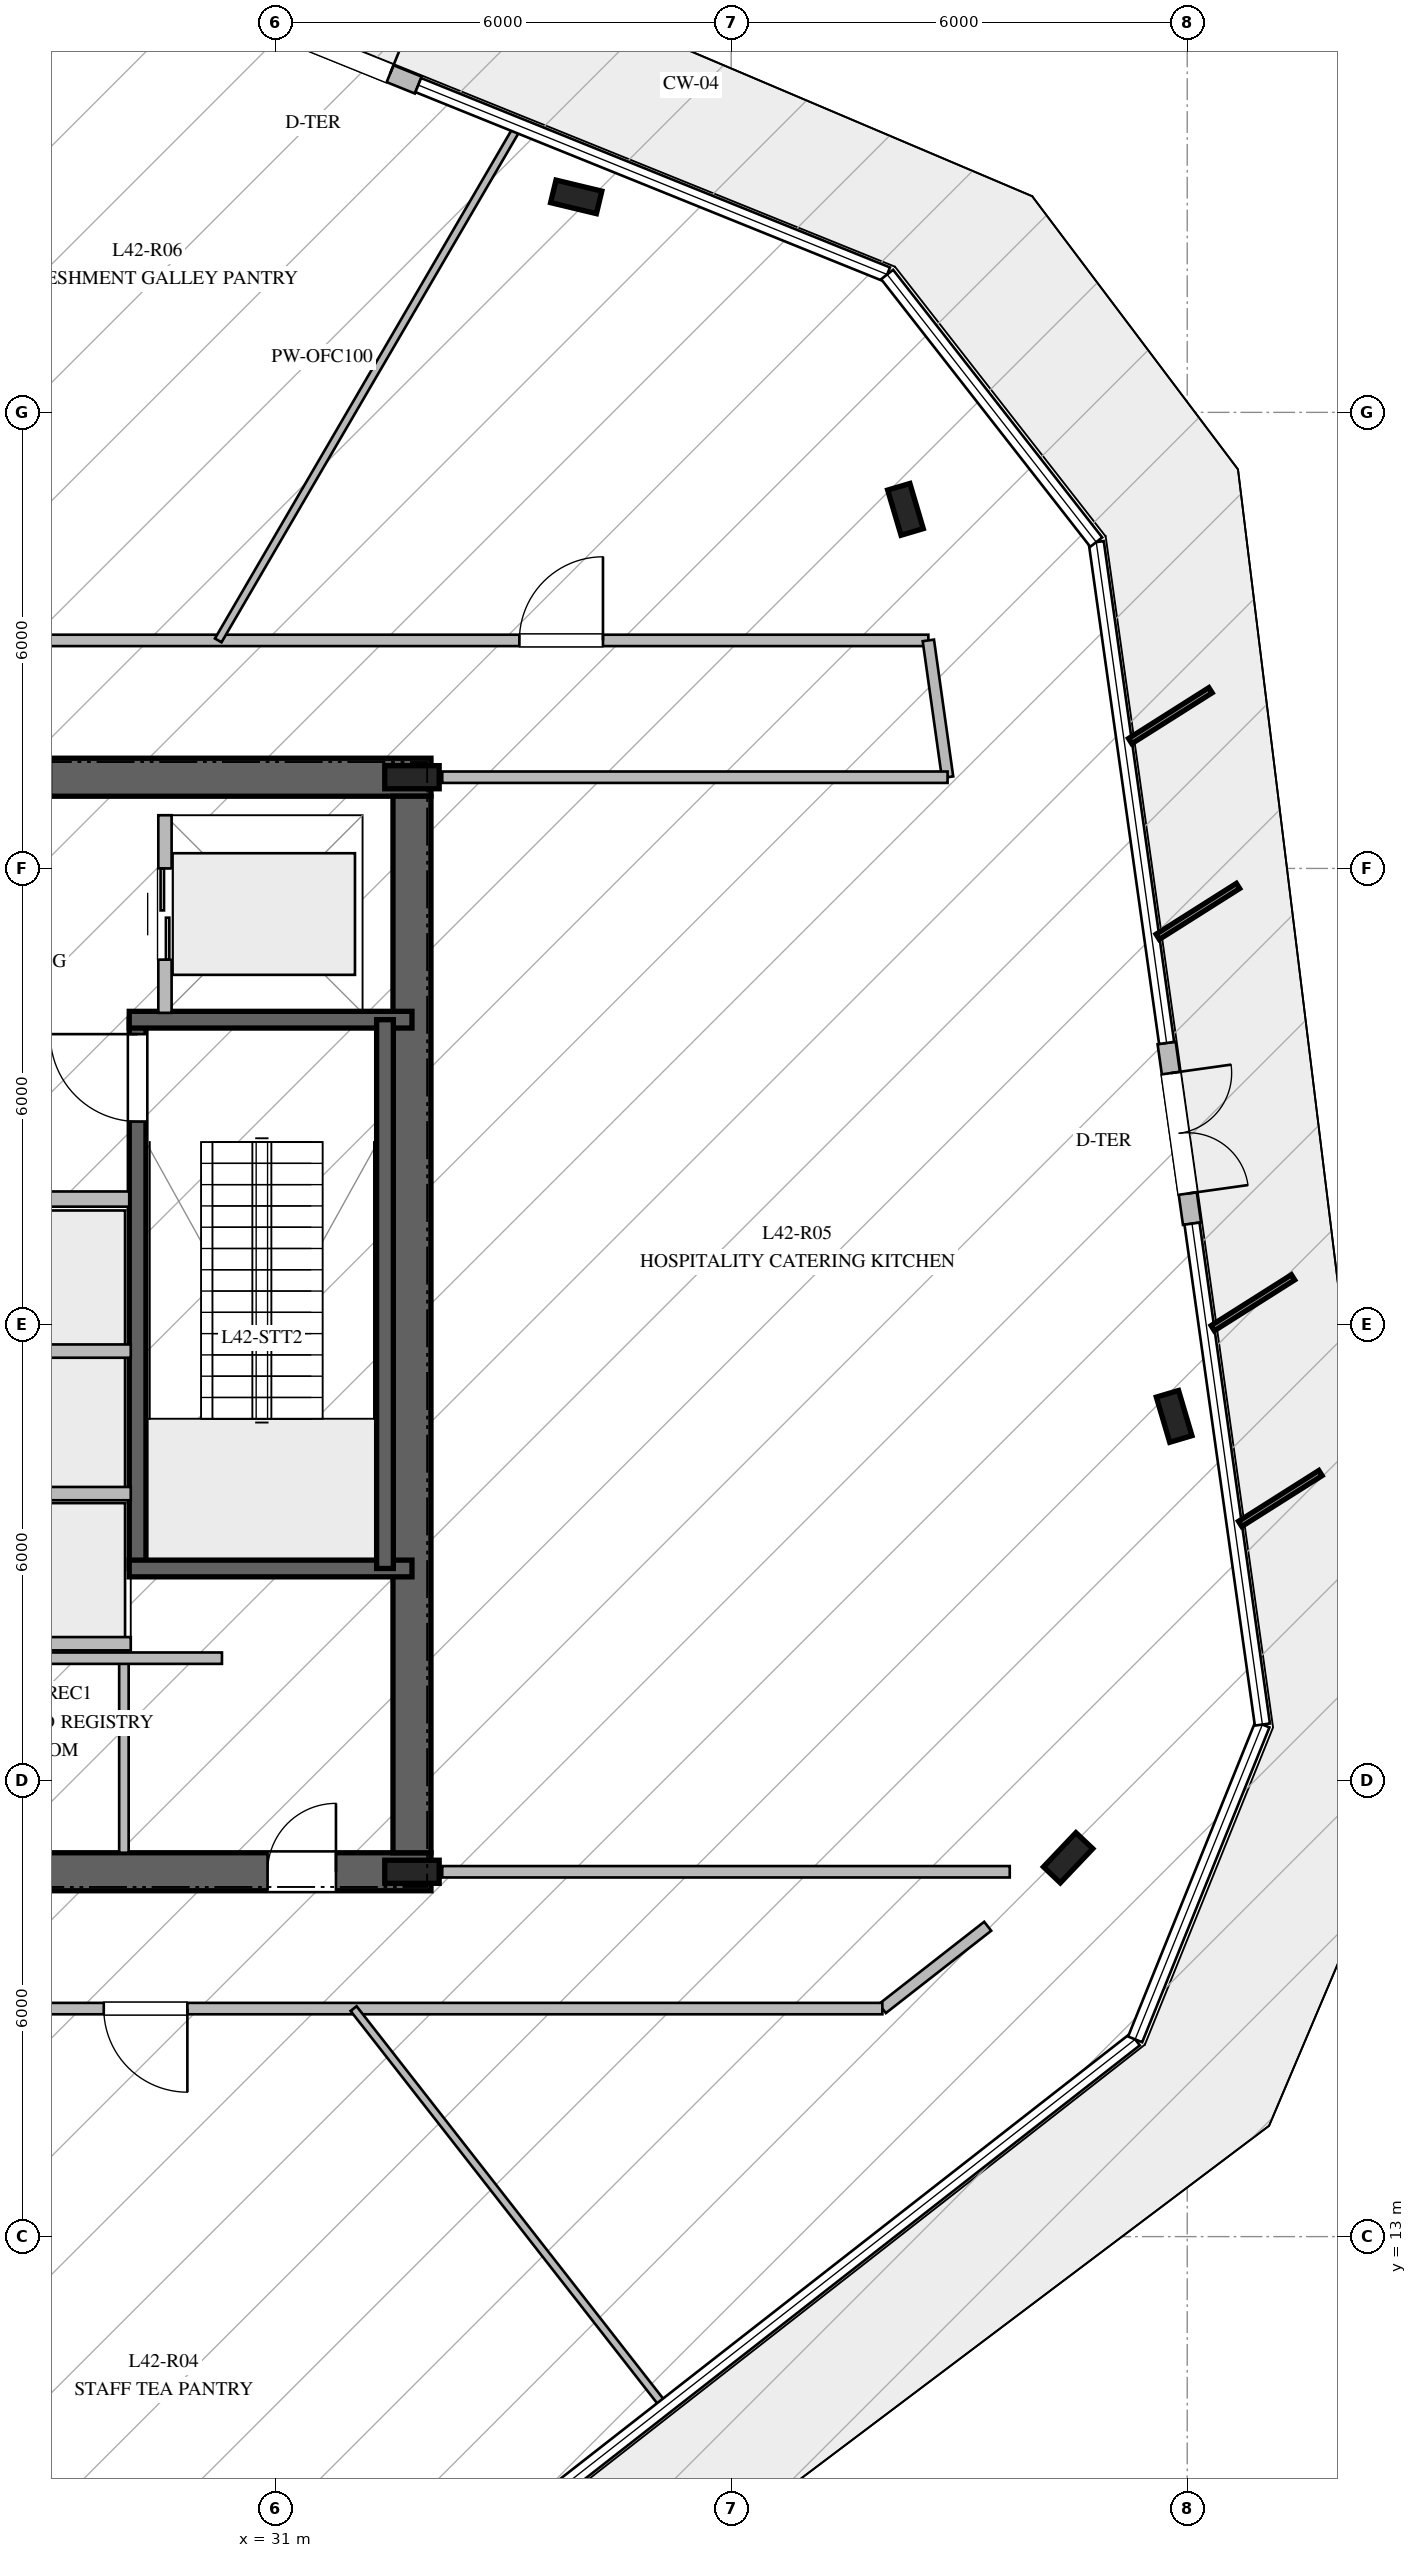
"""IFC4 building model, lengths in metres.
Left out: names, types, materials, properties, quantities, classifications, styles, units other than length and angle.
Written with IfcOpenShell. Run it as: python <this file> out.ifc"""

import sys

from ifc_helpers import new_model, si_unit, direction, frame, frame_2d, origin, origin_2d, place, context, subcontext, project, spatial, rectangle, i_section, extrude, element, fill, save


model = new_model("IFC4")
c1 = context("Model", 3, precision=1e-05, world=origin(), true_north=direction((0.0, 1.0)))
c2 = subcontext(c1, "Body", "Model", "MODEL_VIEW")
j1 = project(units=[si_unit("LENGTHUNIT", "METRE"), si_unit("PLANEANGLEUNIT", "RADIAN")], contexts=[c1])
p1 = place(None, origin())
s1 = spatial("IfcSite", under=j1, at=p1, CompositionType="ELEMENT")
p2 = place(p1, origin())
s2 = spatial("IfcBuilding", under=s1, at=p2, CompositionType="ELEMENT")
p3 = place(p2, frame((0.0, 0.0, 175.8)))
s3 = spatial("IfcBuildingStorey", under=s2, at=p3, CompositionType="ELEMENT", Elevation=175.8)
p4 = place(p3, frame((16.95, 17.8, 0.0), z_axis=(0.0, 0.0, 1.0), x_axis=(1.0, 0.0, 0.0)))
e1 = element("IfcWall", 1, at=p4, inside=s3, PredefinedType="SHEAR", context=c2, shape_type="SweptSolid", body=[
    extrude(rectangle(XDim=16.1, YDim=0.5, at=frame_2d((8.05, 0.0))), origin(), (0.0, 0.0, 1.0), 4.78),
])
p5 = place(p4, frame((5.0, 0.0, 0.0)))
e2 = element("IfcOpeningElement", 2, at=p5, cuts=e1, PredefinedType="OPENING", context=c2, shape_type="SweptSolid", body=[
    extrude(rectangle(XDim=1.2, YDim=2.25, at=frame_2d((0.6, 1.125))), frame((0.0, 0.26, 0.0), z_axis=(0.0, -1.0, 0.0), x_axis=(1.0, 0.0, 0.0)), (0.0, 0.0, 1.0), 0.52),
])
p6 = place(p4, frame((13.95, 0.0, 0.0)))
e3 = element("IfcOpeningElement", 3, at=p6, cuts=e1, PredefinedType="OPENING", context=c2, shape_type="SweptSolid", body=[
    extrude(rectangle(XDim=0.9, YDim=2.1, at=frame_2d((0.45, 1.05))), frame((0.0, 0.26, 0.0), z_axis=(0.0, -1.0, 0.0), x_axis=(1.0, 0.0, 0.0)), (0.0, 0.0, 1.0), 0.52),
])
p7 = place(p4, frame((9.2, 0.0, 0.0)))
e4 = element("IfcOpeningElement", 4, at=p7, cuts=e1, PredefinedType="OPENING", context=c2, shape_type="SweptSolid", body=[
    extrude(rectangle(XDim=1.1, YDim=2.2, at=frame_2d((0.55, 1.1))), frame((0.0, 0.26, 0.0), z_axis=(0.0, -1.0, 0.0), x_axis=(1.0, 0.0, 0.0)), (0.0, 0.0, 1.0), 0.52),
])
p8 = place(p3, frame((33.05, 32.2, 0.0), z_axis=(0.0, 0.0, 1.0), x_axis=(-1.0, 0.0, 0.0)))
e5 = element("IfcWall", 5, at=p8, inside=s3, PredefinedType="SHEAR", context=c2, shape_type="SweptSolid", body=[
    extrude(rectangle(XDim=16.1, YDim=0.5, at=frame_2d((8.05, 0.0))), origin(), (0.0, 0.0, 1.0), 4.78),
])
p9 = place(p8, frame((5.0, 0.0, 0.0)))
e6 = element("IfcOpeningElement", 6, at=p9, cuts=e5, PredefinedType="OPENING", context=c2, shape_type="SweptSolid", body=[
    extrude(rectangle(XDim=1.2, YDim=2.25, at=frame_2d((0.6, 1.125))), frame((0.0, 0.26, 0.0), z_axis=(0.0, -1.0, 0.0), x_axis=(1.0, 0.0, 0.0)), (0.0, 0.0, 1.0), 0.52),
])
p10 = place(p8, frame((11.8, 0.0, 0.0)))
e7 = element("IfcOpeningElement", 7, at=p10, cuts=e5, PredefinedType="OPENING", context=c2, shape_type="SweptSolid", body=[
    extrude(rectangle(XDim=1.1, YDim=2.2, at=frame_2d((0.55, 1.1))), frame((0.0, 0.26, 0.0), z_axis=(0.0, -1.0, 0.0), x_axis=(1.0, 0.0, 0.0)), (0.0, 0.0, 1.0), 0.52),
])
p11 = place(p8, frame((9.825, 0.0, 0.0)))
e8 = element("IfcOpeningElement", 8, at=p11, cuts=e5, PredefinedType="OPENING", context=c2, shape_type="SweptSolid", body=[
    extrude(rectangle(XDim=1.1, YDim=2.2, at=frame_2d((0.55, 1.1))), frame((0.0, 0.26, 0.0), z_axis=(0.0, -1.0, 0.0), x_axis=(1.0, 0.0, 0.0)), (0.0, 0.0, 1.0), 0.52),
])
p12 = place(p8, frame((7.85, 0.0, 0.0)))
e9 = element("IfcOpeningElement", 9, at=p12, cuts=e5, PredefinedType="OPENING", context=c2, shape_type="SweptSolid", body=[
    extrude(rectangle(XDim=1.1, YDim=2.2, at=frame_2d((0.55, 1.1))), frame((0.0, 0.26, 0.0), z_axis=(0.0, -1.0, 0.0), x_axis=(1.0, 0.0, 0.0)), (0.0, 0.0, 1.0), 0.52),
])
p13 = place(p3, frame((32.8, 18.05, 0.0), z_axis=(0.0, 0.0, 1.0), x_axis=(0.0, 1.0, 0.0)))
e10 = element("IfcWall", 10, at=p13, inside=s3, PredefinedType="SHEAR", context=c2, shape_type="SweptSolid", body=[
    extrude(rectangle(XDim=13.9, YDim=0.5, at=frame_2d((6.95, 0.0))), origin(), (0.0, 0.0, 1.0), 4.78),
])
for number, where, z_axis, x_axis in (
    (11, (32.8, 17.8, 0.0), (0.0, 0.0, 1.0), (1.0, 0.0, 0.0)),
    (12, (32.8, 32.2, 0.0), (0.0, 0.0, 1.0), (1.0, 0.0, 0.0)),
):
    element("IfcColumn", number, at=place(p3, frame(where, z_axis=z_axis, x_axis=x_axis)), inside=s3, PredefinedType="COLUMN", context=c2, shape_type="SweptSolid", body=[
        extrude(i_section(OverallWidth=0.304, OverallDepth=0.716, WebThickness=0.021, FlangeThickness=0.04, at=origin_2d()), origin(), (0.0, 0.0, 1.0), 5.0),
    ])
p14 = place(p3, frame((29.19, 21.79, 0.0), z_axis=(0.0, 0.0, 1.0), x_axis=(0.0, 1.0, 0.0)))
e13 = element("IfcWall", 13, at=p14, inside=s3, PredefinedType="SOLIDWALL", context=c2, shape_type="SweptSolid", body=[
    extrude(rectangle(XDim=7.22, YDim=0.22, at=frame_2d((3.61, 0.0))), origin(), (0.0, 0.0, 1.0), 4.78),
])
p15 = place(p14, frame((5.88, 0.0, 0.0)))
e14 = element("IfcOpeningElement", 14, at=p15, cuts=e13, PredefinedType="OPENING", context=c2, shape_type="SweptSolid", body=[
    extrude(rectangle(XDim=1.15, YDim=2.2, at=frame_2d((0.575, 1.1))), frame((0.0, 0.12, 0.0), z_axis=(0.0, -1.0, 0.0), x_axis=(1.0, 0.0, 0.0)), (0.0, 0.0, 1.0), 0.24),
])
for number, where, z_axis, x_axis in (
    (15, (29.08, 21.79, 0.0), (0.0, 0.0, 1.0), (1.0, 0.0, 0.0)),
    (16, (29.08, 29.01, 0.0), (0.0, 0.0, 1.0), (1.0, 0.0, 0.0)),
):
    element("IfcWall", number, at=place(p3, frame(where, z_axis=z_axis, x_axis=x_axis)), inside=s3, PredefinedType="SOLIDWALL", context=c2, shape_type="SweptSolid", body=[
        extrude(rectangle(XDim=3.72, YDim=0.22, at=frame_2d((1.86, 0.0))), origin(), (0.0, 0.0, 1.0), 4.78),
    ])
p16 = place(p3, frame((32.445, 29.01, 0.0), z_axis=(0.0, 0.0, 1.0), x_axis=(0.0, -1.0, 0.0)))
e17 = element("IfcWall", 17, at=p16, inside=s3, PredefinedType="SOLIDWALL", context=c2, shape_type="SweptSolid", body=[
    extrude(rectangle(XDim=7.22, YDim=0.22, at=frame_2d((3.61, 0.0))), origin(), (0.0, 0.0, 1.0), 4.78),
])
for number, where, z_axis, x_axis in (
    (18, (34.961, 39.835, -0.27), (0.0, 0.0, 1.0), (-0.972, 0.233, 0.0)),
    (19, (41.433, 17.984, -0.27), (0.0, 0.0, 1.0), (0.688, 0.725, 0.0)),
    (20, (42.828, 23.791, -0.27), (0.0, 0.0, 1.0), (-0.284, 0.959, 0.0)),
    (21, (39.293, 35.724, -0.27), (0.0, 0.0, 1.0), (-0.284, 0.959, 0.0)),
):
    element("IfcColumn", number, at=place(p3, frame(where, z_axis=z_axis, x_axis=x_axis)), inside=s3, PredefinedType="COLUMN", context=c2, shape_type="SweptSolid", body=[
        extrude(i_section(OverallWidth=0.305, OverallDepth=0.62, WebThickness=0.021, FlangeThickness=0.04, at=origin_2d()), origin(), (0.0, 0.0, 1.0), 5.27),
    ])
p17 = place(p3, frame((32.883, 41.306, 0.0), z_axis=(0.0, 0.0, 1.0), x_axis=(-0.927158943198, 0.374668245315, 0.0)))
e22 = element("IfcWall", 22, at=p17, inside=s3, PredefinedType="STANDARD", context=c2, shape_type="SweptSolid", body=[
    extrude(rectangle(XDim=2.4, YDim=0.24, at=frame_2d((1.2, 0.0))), origin(), (0.0, 0.0, 1.0), 4.78),
])
p18 = place(p17, frame((0.4, 0.0, 0.0)))
e23 = element("IfcOpeningElement", 23, at=p18, cuts=e22, PredefinedType="OPENING", context=c2, shape_type="SweptSolid", body=[
    extrude(rectangle(XDim=1.6, YDim=2.25, at=frame_2d((0.8, 1.125))), frame((0.0, 0.13, 0.0), z_axis=(0.0, -1.0, 0.0), x_axis=(1.0, 0.0, 0.0)), (0.0, 0.0, 1.0), 0.26),
])
p19 = place(p3, frame((43.063, 26.327, 0.0), z_axis=(0.0, 0.0, 1.0), x_axis=(-0.139128609486, 0.990274320591, 0.0)))
e24 = element("IfcWall", 24, at=p19, inside=s3, PredefinedType="STANDARD", context=c2, shape_type="SweptSolid", body=[
    extrude(rectangle(XDim=2.401, YDim=0.24, at=frame_2d((1.2, 0.0))), origin(), (0.0, 0.0, 1.0), 4.78),
])
p20 = place(p19, frame((0.4, 0.0, 0.0)))
e25 = element("IfcOpeningElement", 25, at=p20, cuts=e24, PredefinedType="OPENING", context=c2, shape_type="SweptSolid", body=[
    extrude(rectangle(XDim=1.6, YDim=2.25, at=frame_2d((0.8, 1.125))), frame((0.0, 0.13, 0.0), z_axis=(0.0, -1.0, 0.0), x_axis=(1.0, 0.0, 0.0)), (0.0, 0.0, 1.0), 0.26),
])
p21 = place(p3, frame((25.7, 26.65, 0.0), z_axis=(0.0, 0.0, 1.0), x_axis=(1.0, 0.0, 0.0)))
e26 = element("IfcWall", 26, at=p21, inside=s3, PredefinedType="PARTITIONING", context=c2, shape_type="SweptSolid", body=[
    extrude(rectangle(XDim=3.38, YDim=0.2, at=frame_2d((1.69, 0.0))), origin(), (0.0, 0.0, 1.0), 4.78),
])
p22 = place(p3, frame((29.01, 18.05, 0.0), z_axis=(0.0, 0.0, 1.0), x_axis=(0.0, 1.0, 0.0)))
e27 = element("IfcWall", 27, at=p22, inside=s3, PredefinedType="PARTITIONING", context=c2, shape_type="SweptSolid", body=[
    extrude(rectangle(XDim=2.5, YDim=0.125, at=frame_2d((1.25, 0.0))), origin(), (0.0, 0.0, 1.0), 4.78),
])
p23 = place(p3, frame((24.4, 20.61, 0.0), z_axis=(0.0, 0.0, 1.0), x_axis=(1.0, 0.0, 0.0)))
e28 = element("IfcWall", 28, at=p23, inside=s3, PredefinedType="PARTITIONING", context=c2, shape_type="SweptSolid", body=[
    extrude(rectangle(XDim=5.9, YDim=0.15, at=frame_2d((2.95, 0.0))), origin(), (0.0, 0.0, 1.0), 4.78),
])
for number, where, z_axis, x_axis in (
    (29, (26.75, 20.8, 0.0), (0.0, 0.0, 1.0), (1.0, 0.0, 0.0)),
    (30, (26.75, 22.775, 0.0), (0.0, 0.0, 1.0), (1.0, 0.0, 0.0)),
    (31, (26.75, 24.65, 0.0), (0.0, 0.0, 1.0), (1.0, 0.0, 0.0)),
):
    element("IfcWall", number, at=place(p3, frame(where, z_axis=z_axis, x_axis=x_axis)), inside=s3, PredefinedType="PARTITIONING", context=c2, shape_type="SweptSolid", body=[
        extrude(rectangle(XDim=2.35, YDim=0.175, at=frame_2d((1.175, 0.0))), origin(), (0.0, 0.0, 1.0), 4.78),
    ])
p24 = place(p3, frame((29.55, 29.1, 0.0), z_axis=(0.0, 0.0, 1.0), x_axis=(0.0, 1.0, 0.0)))
e32 = element("IfcWall", 32, at=p24, inside=s3, PredefinedType="PARTITIONING", context=c2, shape_type="SweptSolid", body=[
    extrude(rectangle(XDim=2.6, YDim=0.175, at=frame_2d((1.3, 0.0))), origin(), (0.0, 0.0, 1.0), 4.78),
])
p25 = place(p24, frame((0.7, 0.0, 0.0)))
e33 = element("IfcOpeningElement", 33, at=p25, cuts=e32, PredefinedType="OPENING", context=c2, shape_type="SweptSolid", body=[
    extrude(rectangle(XDim=1.2, YDim=2.2, at=frame_2d((0.6, 1.1))), frame((0.0, 0.098, 0.0), z_axis=(0.0, -1.0, 0.0), x_axis=(1.0, 0.0, 0.0)), (0.0, 0.0, 1.0), 0.195),
])
p26 = place(p3, frame((25.95, 34.0, 0.0), z_axis=(0.0, 0.0, 1.0), x_axis=(1.0, 0.0, 0.0)))
e34 = element("IfcWall", 34, at=p26, inside=s3, PredefinedType="PARTITIONING", context=c2, shape_type="SweptSolid", body=[
    extrude(rectangle(XDim=13.644, YDim=0.15, at=frame_2d((6.822, 0.0))), origin(), (0.0, 0.0, 1.0), 4.18),
])
p27 = place(p26, frame((8.263, 0.0, 0.0)))
e35 = element("IfcOpeningElement", 35, at=p27, cuts=e34, PredefinedType="OPENING", context=c2, shape_type="SweptSolid", body=[
    extrude(rectangle(XDim=1.1, YDim=2.2, at=frame_2d((0.55, 1.1))), frame((0.0, 0.085, 0.0), z_axis=(0.0, -1.0, 0.0), x_axis=(1.0, 0.0, 0.0)), (0.0, 0.0, 1.0), 0.17),
])
p28 = place(p3, frame((39.594, 34.0, 0.0), z_axis=(0.0, 0.0, 1.0), x_axis=(0.139145761488, -0.990271910669, 0.0)))
e36 = element("IfcWall", 36, at=p28, inside=s3, PredefinedType="PARTITIONING", context=c2, shape_type="SweptSolid", body=[
    extrude(rectangle(XDim=1.818, YDim=0.15, at=frame_2d((0.909, 0.0))), origin(), (0.0, 0.0, 1.0), 4.18),
])
p29 = place(p3, frame((39.847, 32.2, 0.0), z_axis=(0.0, 0.0, 1.0), x_axis=(-1.0, 0.0, 0.0)))
e37 = element("IfcWall", 37, at=p29, inside=s3, PredefinedType="PARTITIONING", context=c2, shape_type="SweptSolid", body=[
    extrude(rectangle(XDim=6.649, YDim=0.15, at=frame_2d((3.324, 0.0))), origin(), (0.0, 0.0, 1.0), 4.28),
])
p30 = place(p3, frame((33.198, 17.8, 0.0), z_axis=(0.0, 0.0, 1.0), x_axis=(1.0, 0.0, 0.0)))
e38 = element("IfcWall", 38, at=p30, inside=s3, PredefinedType="PARTITIONING", context=c2, shape_type="SweptSolid", body=[
    extrude(rectangle(XDim=7.467, YDim=0.15, at=frame_2d((3.733, 0.0))), origin(), (0.0, 0.0, 1.0), 4.28),
])
p31 = place(p3, frame((40.375, 17.083, 0.0), z_axis=(0.0, 0.0, 1.0), x_axis=(-0.78796755412, -0.615716764149, 0.0)))
e39 = element("IfcWall", 39, at=p31, inside=s3, PredefinedType="PARTITIONING", context=c2, shape_type="SweptSolid", body=[
    extrude(rectangle(XDim=1.759, YDim=0.15, at=frame_2d((0.879, 0.0))), origin(), (0.0, 0.0, 1.0), 4.18),
])
p32 = place(p3, frame((38.989, 16.0, 0.0), z_axis=(0.0, 0.0, 1.0), x_axis=(-1.0, 0.0, 0.0)))
e40 = element("IfcWall", 40, at=p32, inside=s3, PredefinedType="PARTITIONING", context=c2, shape_type="SweptSolid", body=[
    extrude(rectangle(XDim=13.039, YDim=0.15, at=frame_2d((6.52, 0.0))), origin(), (0.0, 0.0, 1.0), 4.28),
])
p33 = place(p32, frame((9.144, 0.0, 0.0)))
e41 = element("IfcOpeningElement", 41, at=p33, cuts=e40, PredefinedType="OPENING", context=c2, shape_type="SweptSolid", body=[
    extrude(rectangle(XDim=1.1, YDim=2.2, at=frame_2d((0.55, 1.1))), frame((0.0, 0.085, 0.0), z_axis=(0.0, -1.0, 0.0), x_axis=(1.0, 0.0, 0.0)), (0.0, 0.0, 1.0), 0.17),
])
p34 = place(p3, frame((30.251, 34.0, 0.0), z_axis=(0.0, 0.0, 1.0), x_axis=(0.503904002924, 0.863759663238, 0.0)))
e42 = element("IfcWall", 42, at=p34, inside=s3, PredefinedType="MOVABLE", context=c2, shape_type="SweptSolid", body=[
    extrude(rectangle(XDim=7.825, YDim=0.1, at=frame_2d((3.913, 0.0))), origin(), (0.0, 0.0, 1.0), 4.05),
])
p35 = place(p3, frame((32.032, 16.0, 0.0), z_axis=(0.0, 0.0, 1.0), x_axis=(0.615676896023, -0.787998705395, 0.0)))
e43 = element("IfcWall", 43, at=p35, inside=s3, PredefinedType="MOVABLE", context=c2, shape_type="SweptSolid", body=[
    extrude(rectangle(XDim=6.633, YDim=0.1, at=frame_2d((3.317, 0.0))), origin(), (0.0, 0.0, 1.0), 4.18),
])
p36 = place(p18, frame((1.6, 0.0, 0.0), z_axis=(0.0, 0.0, 1.0), x_axis=(-1.0, 0.0, 0.0)))
e44 = element("IfcDoor", 44, at=p36, inside=s3, OperationType="DOUBLE_DOOR_SINGLE_SWING", PredefinedType="DOOR", context=c2, shape_type="SweptSolid", body=[
    extrude(rectangle(XDim=1.6, YDim=2.25, at=frame_2d((0.8, 1.125))), frame((0.0, 0.025, 0.0), z_axis=(0.0, -1.0, 0.0), x_axis=(1.0, 0.0, 0.0)), (0.0, 0.0, 1.0), 0.05),
])
fill(e23, e44)
p37 = place(p20, frame((1.6, 0.0, 0.0), z_axis=(0.0, 0.0, 1.0), x_axis=(-1.0, 0.0, 0.0)))
e45 = element("IfcDoor", 45, at=p37, inside=s3, OperationType="DOUBLE_DOOR_SINGLE_SWING", PredefinedType="DOOR", context=c2, shape_type="SweptSolid", body=[
    extrude(rectangle(XDim=1.6, YDim=2.25, at=frame_2d((0.8, 1.125))), frame((0.0, 0.025, 0.0), z_axis=(0.0, -1.0, 0.0), x_axis=(1.0, 0.0, 0.0)), (0.0, 0.0, 1.0), 0.05),
])
fill(e25, e45)
p38 = place(p15, origin())
e46 = element("IfcDoor", 46, at=p38, inside=s3, OperationType="SINGLE_SWING_RIGHT", PredefinedType="DOOR", context=c2, shape_type="SweptSolid", body=[
    extrude(rectangle(XDim=1.15, YDim=2.2, at=frame_2d((0.575, 1.1))), frame((0.0, 0.025, 0.0), z_axis=(0.0, -1.0, 0.0), x_axis=(1.0, 0.0, 0.0)), (0.0, 0.0, 1.0), 0.05),
])
fill(e14, e46)
p39 = place(p6, origin())
e47 = element("IfcDoor", 47, at=p39, inside=s3, OperationType="SINGLE_SWING_RIGHT", PredefinedType="DOOR", context=c2, shape_type="SweptSolid", body=[
    extrude(rectangle(XDim=0.9, YDim=2.1, at=frame_2d((0.45, 1.05))), frame((0.0, 0.025, 0.0), z_axis=(0.0, -1.0, 0.0), x_axis=(1.0, 0.0, 0.0)), (0.0, 0.0, 1.0), 0.05),
])
fill(e3, e47)
p40 = place(p25, origin())
e48 = element("IfcDoor", 48, at=p40, inside=s3, OperationType="DOUBLE_DOOR_SLIDING", PredefinedType="DOOR", context=c2, shape_type="SweptSolid", body=[
    extrude(rectangle(XDim=1.2, YDim=2.2, at=frame_2d((0.6, 1.1))), frame((0.0, 0.025, 0.0), z_axis=(0.0, -1.0, 0.0), x_axis=(1.0, 0.0, 0.0)), (0.0, 0.0, 1.0), 0.05),
])
fill(e33, e48)
p41 = place(p33, origin())
e49 = element("IfcDoor", 49, at=p41, inside=s3, OperationType="SINGLE_SWING_LEFT", PredefinedType="DOOR", context=c2, shape_type="SweptSolid", body=[
    extrude(rectangle(XDim=1.1, YDim=2.2, at=frame_2d((0.55, 1.1))), frame((0.0, 0.025, 0.0), z_axis=(0.0, -1.0, 0.0), x_axis=(1.0, 0.0, 0.0)), (0.0, 0.0, 1.0), 0.05),
])
fill(e41, e49)
p42 = place(p27, origin())
e50 = element("IfcDoor", 50, at=p42, inside=s3, OperationType="SINGLE_SWING_RIGHT", PredefinedType="DOOR", context=c2, shape_type="SweptSolid", body=[
    extrude(rectangle(XDim=1.1, YDim=2.2, at=frame_2d((0.55, 1.1))), frame((0.0, 0.025, 0.0), z_axis=(0.0, -1.0, 0.0), x_axis=(1.0, 0.0, 0.0)), (0.0, 0.0, 1.0), 0.05),
])
fill(e35, e50)
save(model, sys.argv[1])
